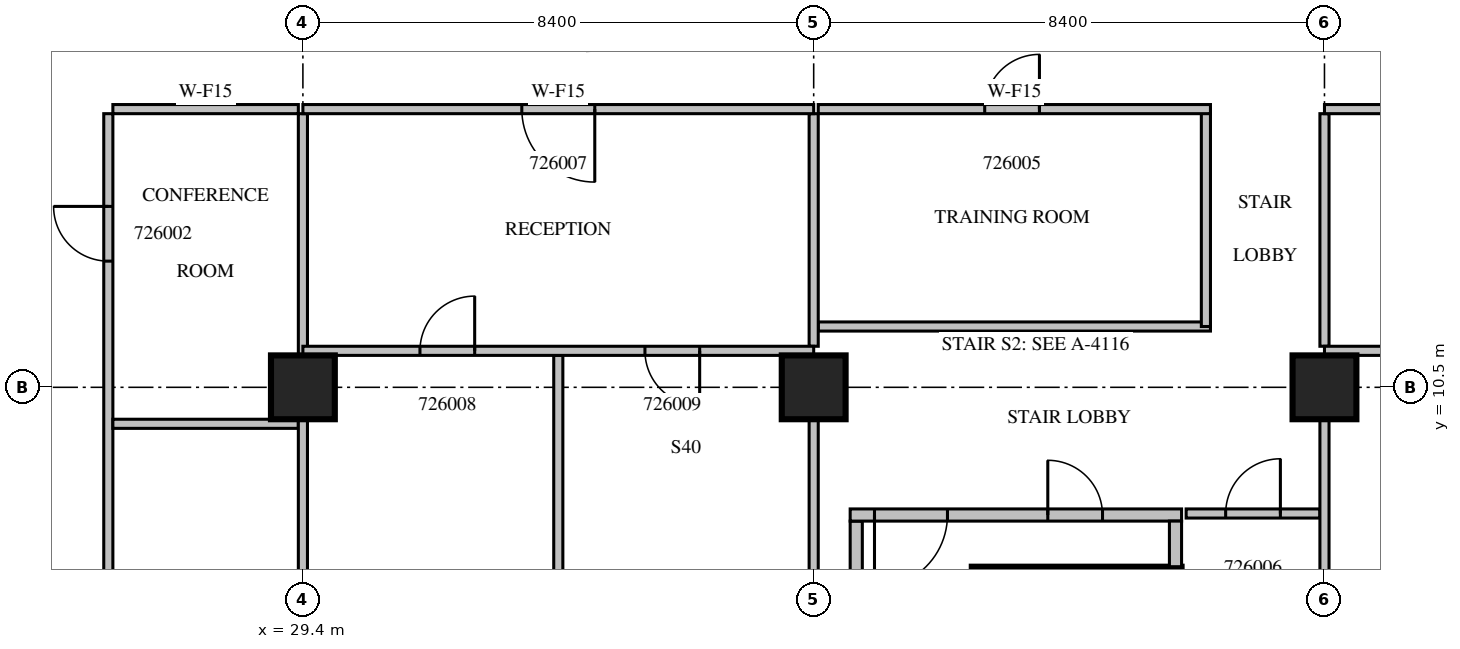
"""IFC4 building model, lengths in metres.
Left out: names, types, materials, properties, quantities, classifications, styles, units other than length and angle.
Written with IfcOpenShell. Run it as: python <this file> out.ifc"""

import sys

from ifc_helpers import new_model, si_unit, direction, frame, frame_2d, origin, origin_2d, place, context, subcontext, project, spatial, rectangle, extrude, source, transform, mapped, element, fill, save


model = new_model("IFC4")
c1 = context("Model", 3, precision=1e-05, world=origin(), true_north=direction((0.0, 1.0)))
c2 = subcontext(c1, "Body", "Model", "MODEL_VIEW")
j1 = project(units=[si_unit("LENGTHUNIT", "METRE"), si_unit("PLANEANGLEUNIT", "RADIAN")], contexts=[c1])
p1 = place(None, origin())
s1 = spatial("IfcSite", under=j1, at=p1, CompositionType="ELEMENT")
p2 = place(p1, origin())
s2 = spatial("IfcBuilding", under=s1, at=p2, CompositionType="ELEMENT")
p3 = place(p2, frame((0.0, 0.0, 120.3)))
s3 = spatial("IfcBuildingStorey", under=s2, at=p3, CompositionType="ELEMENT", Elevation=120.3)
m1 = source(origin(), c2, "Body", "SweptSolid", [
    extrude(rectangle(XDim=1.05, YDim=1.05, at=origin_2d()), origin(), (0.0, 0.0, 1.0), 4.2),
])
for number, where, z_axis, x_axis in (
    (1, (29.4, 10.5, 0.0), (0.0, 0.0, 1.0), (1.0, 0.0, 0.0)),
    (2, (37.8, 10.5, 0.0), (0.0, 0.0, 1.0), (1.0, 0.0, 0.0)),
    (3, (46.2, 10.5, 0.0), (0.0, 0.0, 1.0), (1.0, 0.0, 0.0)),
):
    element("IfcColumn", number, at=place(p3, frame(where, z_axis=z_axis, x_axis=x_axis)), inside=s3, PredefinedType="COLUMN", context=c2, shape_type="MappedRepresentation", body=[
        mapped(m1, transform((0.0, 0.0, 0.0), scale=1.0)),
    ])
m2 = source(origin(), c2, "Body", "SweptSolid", [
    extrude(rectangle(XDim=3.45, YDim=0.25, at=frame_2d((1.725, 0.0))), origin(), (0.0, 0.0, 1.0), 3.8),
])
p4 = place(p3, frame((40.4, 7.425, 0.0), z_axis=(0.0, 0.0, 1.0), x_axis=(1.0, 0.0, 0.0)))
e4 = element("IfcWall", 4, at=p4, inside=s3, PredefinedType="SOLIDWALL", context=c2, shape_type="MappedRepresentation", body=[
    mapped(m2, transform((0.0, 0.0, 0.0), scale=1.0)),
])
m3 = source(origin(), c2, "Body", "SweptSolid", [
    extrude(rectangle(XDim=8.0, YDim=0.2, at=frame_2d((4.0, 0.0))), origin(), (0.0, 0.0, 1.0), 3.8),
])
p5 = place(p3, frame((38.5, 0.3, 0.0), z_axis=(0.0, 0.0, 1.0), x_axis=(0.0, 1.0, 0.0)))
e5 = element("IfcWall", 5, at=p5, inside=s3, PredefinedType="PARTITIONING", context=c2, shape_type="MappedRepresentation", body=[
    mapped(m3, transform((0.0, 0.0, 0.0), scale=1.0)),
])
m4 = source(origin(), c2, "Body", "SweptSolid", [
    extrude(rectangle(XDim=5.45, YDim=0.2, at=frame_2d((2.725, 0.0))), origin(), (0.0, 0.0, 1.0), 3.8),
])
p6 = place(p3, frame((38.4, 8.4, 0.0), z_axis=(0.0, 0.0, 1.0), x_axis=(1.0, 0.0, 0.0)))
e6 = element("IfcWall", 6, at=p6, inside=s3, PredefinedType="PARTITIONING", context=c2, shape_type="MappedRepresentation", body=[
    mapped(m4, transform((0.0, 0.0, 0.0), scale=1.0)),
])
m5 = source(origin(), c2, "Body", "SweptSolid", [
    extrude(rectangle(XDim=1.2, YDim=2.1, at=frame_2d((0.6, 1.05))), frame((0.0, 0.11, 0.0), z_axis=(0.0, -1.0, 0.0), x_axis=(1.0, 0.0, 0.0)), (0.0, 0.0, 1.0), 0.22),
])
p7 = place(p6, frame((0.4, 0.0, 0.0)))
e7 = element("IfcOpeningElement", 7, at=p7, cuts=e6, PredefinedType="OPENING", context=c2, shape_type="MappedRepresentation", body=[
    mapped(m5, transform((0.0, 0.0, 0.0), scale=1.0)),
])
m6 = source(origin(), c2, "Body", "SweptSolid", [
    extrude(rectangle(XDim=0.9, YDim=2.1, at=frame_2d((0.45, 1.05))), frame((0.0, 0.11, 0.0), z_axis=(0.0, -1.0, 0.0), x_axis=(1.0, 0.0, 0.0)), (0.0, 0.0, 1.0), 0.22),
])
p8 = place(p6, frame((3.25, 0.0, 0.0)))
e8 = element("IfcOpeningElement", 8, at=p8, cuts=e6, PredefinedType="OPENING", context=c2, shape_type="MappedRepresentation", body=[
    mapped(m6, transform((0.0, 0.0, 0.0), scale=1.0)),
])
m7 = source(origin(), c2, "Body", "SweptSolid", [
    extrude(rectangle(XDim=0.75, YDim=0.2, at=frame_2d((0.375, 0.0))), origin(), (0.0, 0.0, 1.0), 3.8),
])
p9 = place(p3, frame((43.75, 7.55, 0.0), z_axis=(0.0, 0.0, 1.0), x_axis=(0.0, 1.0, 0.0)))
e9 = element("IfcWall", 9, at=p9, inside=s3, PredefinedType="PARTITIONING", context=c2, shape_type="MappedRepresentation", body=[
    mapped(m7, transform((0.0, 0.0, 0.0), scale=1.0)),
])
m8 = source(origin(), c2, "Body", "SweptSolid", [
    extrude(rectangle(XDim=11.725, YDim=0.15, at=frame_2d((5.862, 0.0))), origin(), (0.0, 0.0, 1.0), 3.8),
])
p10 = place(p3, frame((26.2, 15.0, 0.0), z_axis=(0.0, 0.0, 1.0), x_axis=(0.0, -1.0, 0.0)))
e10 = element("IfcWall", 10, at=p10, inside=s3, PredefinedType="PARTITIONING", context=c2, shape_type="MappedRepresentation", body=[
    mapped(m8, transform((0.0, 0.0, 0.0), scale=1.0)),
])
m9 = source(origin(), c2, "Body", "SweptSolid", [
    extrude(rectangle(XDim=0.9, YDim=2.1, at=frame_2d((0.45, 1.05))), frame((0.0, 0.085, 0.0), z_axis=(0.0, -1.0, 0.0), x_axis=(1.0, 0.0, 0.0)), (0.0, 0.0, 1.0), 0.17),
])
p11 = place(p10, frame((8.262, 0.0, 0.0)))
e11 = element("IfcOpeningElement", 11, at=p11, cuts=e10, PredefinedType="OPENING", context=c2, shape_type="MappedRepresentation", body=[
    mapped(m9, transform((0.0, 0.0, 0.0), scale=1.0)),
])
p12 = place(p10, frame((1.525, 0.0, 0.0)))
e12 = element("IfcOpeningElement", 12, at=p12, cuts=e10, PredefinedType="OPENING", context=c2, shape_type="MappedRepresentation", body=[
    mapped(m9, transform((0.0, 0.0, 0.0), scale=1.0)),
])
m10 = source(origin(), c2, "Body", "SweptSolid", [
    extrude(rectangle(XDim=3.05, YDim=0.15, at=frame_2d((1.525, 0.0))), origin(), (0.0, 0.0, 1.0), 3.8),
])
for number, where, z_axis, x_axis in (
    (13, (29.325, 9.9, 0.0), (0.0, 0.0, 1.0), (-1.0, 0.0, 0.0)),
    (14, (29.325, 15.075, 0.0), (0.0, 0.0, 1.0), (-1.0, 0.0, 0.0)),
):
    element("IfcWall", number, at=place(p3, frame(where, z_axis=z_axis, x_axis=x_axis)), inside=s3, PredefinedType="PARTITIONING", context=c2, shape_type="MappedRepresentation", body=[
        mapped(m10, transform((0.0, 0.0, 0.0), scale=1.0)),
    ])
m11 = source(origin(), c2, "Body", "SweptSolid", [
    extrude(rectangle(XDim=6.701, YDim=0.15, at=frame_2d((3.35, 0.0))), origin(), (0.0, 0.0, 1.0), 3.8),
])
p13 = place(p3, frame((29.4, 3.275, 0.0), z_axis=(0.0, 0.0, 1.0), x_axis=(0.0, 1.0, 0.0)))
e15 = element("IfcWall", 15, at=p13, inside=s3, PredefinedType="PARTITIONING", context=c2, shape_type="MappedRepresentation", body=[
    mapped(m11, transform((0.0, 0.0, 0.0), scale=1.0)),
])
m12 = source(origin(), c2, "Body", "SweptSolid", [
    extrude(rectangle(XDim=3.976, YDim=0.15, at=frame_2d((1.988, 0.0))), origin(), (0.0, 0.0, 1.0), 3.8),
])
p14 = place(p3, frame((29.4, 11.024, 0.0), z_axis=(0.0, 0.0, 1.0), x_axis=(0.0, 1.0, 0.0)))
e16 = element("IfcWall", 16, at=p14, inside=s3, PredefinedType="PARTITIONING", context=c2, shape_type="MappedRepresentation", body=[
    mapped(m12, transform((0.0, 0.0, 0.0), scale=1.0)),
])
m13 = source(origin(), c2, "Body", "SweptSolid", [
    extrude(rectangle(XDim=6.45, YDim=0.15, at=frame_2d((3.225, 0.0))), origin(), (0.0, 0.0, 1.0), 3.8),
])
p15 = place(p3, frame((37.875, 11.5, 0.0), z_axis=(0.0, 0.0, 1.0), x_axis=(1.0, 0.0, 0.0)))
e17 = element("IfcWall", 17, at=p15, inside=s3, PredefinedType="PARTITIONING", context=c2, shape_type="MappedRepresentation", body=[
    mapped(m13, transform((0.0, 0.0, 0.0), scale=1.0)),
])
m14 = source(origin(), c2, "Body", "SweptSolid", [
    extrude(rectangle(XDim=3.575, YDim=0.15, at=frame_2d((1.788, 0.0))), origin(), (0.0, 0.0, 1.0), 3.8),
])
p16 = place(p3, frame((44.25, 11.5, 0.0), z_axis=(0.0, 0.0, 1.0), x_axis=(0.0, 1.0, 0.0)))
e18 = element("IfcWall", 18, at=p16, inside=s3, PredefinedType="PARTITIONING", context=c2, shape_type="MappedRepresentation", body=[
    mapped(m14, transform((0.0, 0.0, 0.0), scale=1.0)),
])
p17 = place(p3, frame((44.325, 15.075, 0.0), z_axis=(0.0, 0.0, 1.0), x_axis=(-1.0, 0.0, 0.0)))
e19 = element("IfcWall", 19, at=p17, inside=s3, PredefinedType="PARTITIONING", context=c2, shape_type="MappedRepresentation", body=[
    mapped(m13, transform((0.0, 0.0, 0.0), scale=1.0)),
])
p18 = place(p17, frame((2.812, 0.0, 0.0)))
e20 = element("IfcOpeningElement", 20, at=p18, cuts=e19, PredefinedType="OPENING", context=c2, shape_type="MappedRepresentation", body=[
    mapped(m9, transform((0.0, 0.0, 0.0), scale=1.0)),
])
m15 = source(origin(), c2, "Body", "SweptSolid", [
    extrude(rectangle(XDim=2.2, YDim=0.15, at=frame_2d((1.1, 0.0))), origin(), (0.0, 0.0, 1.0), 3.8),
])
p19 = place(p3, frame((46.125, 8.425, 0.0), z_axis=(0.0, 0.0, 1.0), x_axis=(-1.0, 0.0, 0.0)))
e21 = element("IfcWall", 21, at=p19, inside=s3, PredefinedType="PARTITIONING", context=c2, shape_type="MappedRepresentation", body=[
    mapped(m15, transform((0.0, 0.0, 0.0), scale=1.0)),
])
p20 = place(p19, frame((0.65, 0.0, 0.0)))
e22 = element("IfcOpeningElement", 22, at=p20, cuts=e21, PredefinedType="OPENING", context=c2, shape_type="MappedRepresentation", body=[
    mapped(m9, transform((0.0, 0.0, 0.0), scale=1.0)),
])
m16 = source(origin(), c2, "Body", "SweptSolid", [
    extrude(rectangle(XDim=10.725, YDim=0.15, at=frame_2d((5.362, 0.0))), origin(), (0.0, 0.0, 1.0), 3.8),
])
p21 = place(p3, frame((33.6, 0.3, 0.0), z_axis=(0.0, 0.0, 1.0), x_axis=(0.0, 1.0, 0.0)))
e23 = element("IfcWall", 23, at=p21, inside=s3, PredefinedType="PARTITIONING", context=c2, shape_type="MappedRepresentation", body=[
    mapped(m16, transform((0.0, 0.0, 0.0), scale=1.0)),
])
m17 = source(origin(), c2, "Body", "SweptSolid", [
    extrude(rectangle(XDim=8.927, YDim=0.15, at=frame_2d((4.463, 0.0))), origin(), (0.0, 0.0, 1.0), 3.8),
])
p22 = place(p3, frame((37.8, 1.049, 0.0), z_axis=(0.0, 0.0, 1.0), x_axis=(0.0, 1.0, 0.0)))
e24 = element("IfcWall", 24, at=p22, inside=s3, PredefinedType="PARTITIONING", context=c2, shape_type="MappedRepresentation", body=[
    mapped(m17, transform((0.0, 0.0, 0.0), scale=1.0)),
])
m18 = source(origin(), c2, "Body", "SweptSolid", [
    extrude(rectangle(XDim=3.825, YDim=0.15, at=frame_2d((1.913, 0.0))), origin(), (0.0, 0.0, 1.0), 3.8),
])
p23 = place(p3, frame((37.8, 11.175, 0.0), z_axis=(0.0, 0.0, 1.0), x_axis=(0.0, 1.0, 0.0)))
e25 = element("IfcWall", 25, at=p23, inside=s3, PredefinedType="PARTITIONING", context=c2, shape_type="MappedRepresentation", body=[
    mapped(m18, transform((0.0, 0.0, 0.0), scale=1.0)),
])
m19 = source(origin(), c2, "Body", "SweptSolid", [
    extrude(rectangle(XDim=8.4, YDim=0.15, at=frame_2d((4.2, 0.0))), origin(), (0.0, 0.0, 1.0), 3.8),
])
p24 = place(p3, frame((37.8, 11.1, 0.0), z_axis=(0.0, 0.0, 1.0), x_axis=(-1.0, 0.0, 0.0)))
e26 = element("IfcWall", 26, at=p24, inside=s3, PredefinedType="PARTITIONING", context=c2, shape_type="MappedRepresentation", body=[
    mapped(m19, transform((0.0, 0.0, 0.0), scale=1.0)),
])
p25 = place(p24, frame((5.575, 0.0, 0.0)))
e27 = element("IfcOpeningElement", 27, at=p25, cuts=e26, PredefinedType="OPENING", context=c2, shape_type="MappedRepresentation", body=[
    mapped(m9, transform((0.0, 0.0, 0.0), scale=1.0)),
])
p26 = place(p24, frame((1.875, 0.0, 0.0)))
e28 = element("IfcOpeningElement", 28, at=p26, cuts=e26, PredefinedType="OPENING", context=c2, shape_type="MappedRepresentation", body=[
    mapped(m9, transform((0.0, 0.0, 0.0), scale=1.0)),
])
p27 = place(p3, frame((46.2, 1.049, 0.0), z_axis=(0.0, 0.0, 1.0), x_axis=(0.0, 1.0, 0.0)))
e29 = element("IfcWall", 29, at=p27, inside=s3, PredefinedType="PARTITIONING", context=c2, shape_type="MappedRepresentation", body=[
    mapped(m17, transform((0.0, 0.0, 0.0), scale=1.0)),
])
p28 = place(p3, frame((46.2, 11.175, 0.0), z_axis=(0.0, 0.0, 1.0), x_axis=(0.0, 1.0, 0.0)))
e30 = element("IfcWall", 30, at=p28, inside=s3, PredefinedType="PARTITIONING", context=c2, shape_type="MappedRepresentation", body=[
    mapped(m18, transform((0.0, 0.0, 0.0), scale=1.0)),
])
m20 = source(origin(), c2, "Body", "SweptSolid", [
    extrude(rectangle(XDim=24.9, YDim=0.15, at=frame_2d((12.45, 0.0))), origin(), (0.0, 0.0, 1.0), 3.8),
])
p29 = place(p3, frame((71.1, 11.1, 0.0), z_axis=(0.0, 0.0, 1.0), x_axis=(-1.0, 0.0, 0.0)))
e31 = element("IfcWall", 31, at=p29, inside=s3, PredefinedType="PARTITIONING", context=c2, shape_type="MappedRepresentation", body=[
    mapped(m20, transform((0.0, 0.0, 0.0), scale=1.0)),
])
m21 = source(origin(), c2, "Body", "SweptSolid", [
    extrude(rectangle(XDim=1.1, YDim=2.1, at=frame_2d((0.55, 1.05))), frame((0.0, 0.085, 0.0), z_axis=(0.0, -1.0, 0.0), x_axis=(1.0, 0.0, 0.0)), (0.0, 0.0, 1.0), 0.17),
])
p30 = place(p29, frame((14.493, 0.0, 0.0)))
e32 = element("IfcOpeningElement", 32, at=p30, cuts=e31, PredefinedType="OPENING", context=c2, shape_type="MappedRepresentation", body=[
    mapped(m21, transform((0.0, 0.0, 0.0), scale=1.0)),
])
p31 = place(p29, frame((10.614, 0.0, 0.0)))
e33 = element("IfcOpeningElement", 33, at=p31, cuts=e31, PredefinedType="OPENING", context=c2, shape_type="MappedRepresentation", body=[
    mapped(m21, transform((0.0, 0.0, 0.0), scale=1.0)),
])
p32 = place(p3, frame((37.8, 15.075, 0.0), z_axis=(0.0, 0.0, 1.0), x_axis=(-1.0, 0.0, 0.0)))
e34 = element("IfcWall", 34, at=p32, inside=s3, PredefinedType="PARTITIONING", context=c2, shape_type="MappedRepresentation", body=[
    mapped(m19, transform((0.0, 0.0, 0.0), scale=1.0)),
])
m22 = source(origin(), c2, "Body", "SweptSolid", [
    extrude(rectangle(XDim=1.2, YDim=2.1, at=frame_2d((0.6, 1.05))), frame((0.0, 0.085, 0.0), z_axis=(0.0, -1.0, 0.0), x_axis=(1.0, 0.0, 0.0)), (0.0, 0.0, 1.0), 0.17),
])
p33 = place(p32, frame((3.6, 0.0, 0.0)))
e35 = element("IfcOpeningElement", 35, at=p33, cuts=e34, PredefinedType="OPENING", context=c2, shape_type="MappedRepresentation", body=[
    mapped(m22, transform((0.0, 0.0, 0.0), scale=1.0)),
])
p34 = place(p3, frame((71.1, 15.075, 0.0), z_axis=(0.0, 0.0, 1.0), x_axis=(-1.0, 0.0, 0.0)))
e36 = element("IfcWall", 36, at=p34, inside=s3, PredefinedType="PARTITIONING", context=c2, shape_type="MappedRepresentation", body=[
    mapped(m20, transform((0.0, 0.0, 0.0), scale=1.0)),
])
p35 = place(p34, frame((14.266, 0.0, 0.0)))
e37 = element("IfcOpeningElement", 37, at=p35, cuts=e36, PredefinedType="OPENING", context=c2, shape_type="MappedRepresentation", body=[
    mapped(m21, transform((0.0, 0.0, 0.0), scale=1.0)),
])
p36 = place(p34, frame((21.51, 0.0, 0.0)))
e38 = element("IfcOpeningElement", 38, at=p36, cuts=e36, PredefinedType="OPENING", context=c2, shape_type="MappedRepresentation", body=[
    mapped(m9, transform((0.0, 0.0, 0.0), scale=1.0)),
])
p37 = place(p34, frame((17.306, 0.0, 0.0)))
e39 = element("IfcOpeningElement", 39, at=p37, cuts=e36, PredefinedType="OPENING", context=c2, shape_type="MappedRepresentation", body=[
    mapped(m9, transform((0.0, 0.0, 0.0), scale=1.0)),
])
p38 = place(p34, frame((10.889, 0.0, 0.0)))
e40 = element("IfcOpeningElement", 40, at=p38, cuts=e36, PredefinedType="OPENING", context=c2, shape_type="MappedRepresentation", body=[
    mapped(m21, transform((0.0, 0.0, 0.0), scale=1.0)),
])
p39 = place(p34, frame((8.05, 0.0, 0.0)))
e41 = element("IfcOpeningElement", 41, at=p39, cuts=e36, PredefinedType="OPENING", context=c2, shape_type="MappedRepresentation", body=[
    mapped(m9, transform((0.0, 0.0, 0.0), scale=1.0)),
])
p40 = place(p34, frame((5.108, 0.0, 0.0)))
e42 = element("IfcOpeningElement", 42, at=p40, cuts=e36, PredefinedType="OPENING", context=c2, shape_type="MappedRepresentation", body=[
    mapped(m9, transform((0.0, 0.0, 0.0), scale=1.0)),
])
p41 = place(p34, frame((2.27, 0.0, 0.0)))
e43 = element("IfcOpeningElement", 43, at=p41, cuts=e36, PredefinedType="OPENING", context=c2, shape_type="MappedRepresentation", body=[
    mapped(m9, transform((0.0, 0.0, 0.0), scale=1.0)),
])
p42 = place(p34, frame((0.305, 0.0, 0.0)))
e44 = element("IfcOpeningElement", 44, at=p42, cuts=e36, PredefinedType="OPENING", context=c2, shape_type="MappedRepresentation", body=[
    mapped(m9, transform((0.0, 0.0, 0.0), scale=1.0)),
])
m23 = source(origin(), c2, "Body", "SweptSolid", [
    extrude(rectangle(XDim=1.2, YDim=2.1, at=frame_2d((0.6, 1.05))), frame((0.0, 0.025, 0.0), z_axis=(0.0, -1.0, 0.0), x_axis=(1.0, 0.0, 0.0)), (0.0, 0.0, 1.0), 0.05),
])
p43 = place(p7, origin())
e45 = element("IfcDoor", 45, at=p43, inside=s3, OperationType="SINGLE_SWING_RIGHT", PredefinedType="DOOR", context=c2, shape_type="MappedRepresentation", body=[
    mapped(m23, transform((0.0, 0.0, 0.0), scale=1.0)),
])
fill(e7, e45)
m24 = source(origin(), c2, "Body", "SweptSolid", [
    extrude(rectangle(XDim=0.9, YDim=2.1, at=frame_2d((0.45, 1.05))), frame((0.0, 0.025, 0.0), z_axis=(0.0, -1.0, 0.0), x_axis=(1.0, 0.0, 0.0)), (0.0, 0.0, 1.0), 0.05),
])
p44 = place(p8, origin())
e46 = element("IfcDoor", 46, at=p44, inside=s3, OperationType="SINGLE_SWING_LEFT", PredefinedType="DOOR", context=c2, shape_type="MappedRepresentation", body=[
    mapped(m24, transform((0.0, 0.0, 0.0), scale=1.0)),
])
fill(e8, e46)
p45 = place(p12, origin())
e47 = element("IfcDoor", 47, at=p45, inside=s3, OperationType="SINGLE_SWING_RIGHT", PredefinedType="DOOR", context=c2, shape_type="MappedRepresentation", body=[
    mapped(m24, transform((0.0, 0.0, 0.0), scale=1.0)),
])
fill(e12, e47)
p46 = place(p18, origin())
e48 = element("IfcDoor", 48, at=p46, inside=s3, OperationType="SINGLE_SWING_RIGHT", PredefinedType="DOOR", context=c2, shape_type="MappedRepresentation", body=[
    mapped(m24, transform((0.0, 0.0, 0.0), scale=1.0)),
])
fill(e20, e48)
p47 = place(p20, origin())
e49 = element("IfcDoor", 49, at=p47, inside=s3, OperationType="SINGLE_SWING_RIGHT", PredefinedType="DOOR", context=c2, shape_type="MappedRepresentation", body=[
    mapped(m24, transform((0.0, 0.0, 0.0), scale=1.0)),
])
fill(e22, e49)
p48 = place(p33, origin())
e50 = element("IfcDoor", 50, at=p48, inside=s3, OperationType="SINGLE_SWING_LEFT", PredefinedType="DOOR", context=c2, shape_type="MappedRepresentation", body=[
    mapped(m23, transform((0.0, 0.0, 0.0), scale=1.0)),
])
fill(e35, e50)
p49 = place(p25, origin())
e51 = element("IfcDoor", 51, at=p49, inside=s3, OperationType="SINGLE_SWING_RIGHT", PredefinedType="DOOR", context=c2, shape_type="MappedRepresentation", body=[
    mapped(m24, transform((0.0, 0.0, 0.0), scale=1.0)),
])
fill(e27, e51)
p50 = place(p26, origin())
e52 = element("IfcDoor", 52, at=p50, inside=s3, OperationType="SINGLE_SWING_LEFT", PredefinedType="DOOR", context=c2, shape_type="MappedRepresentation", body=[
    mapped(m24, transform((0.0, 0.0, 0.0), scale=1.0)),
])
fill(e28, e52)
save(model, sys.argv[1])
